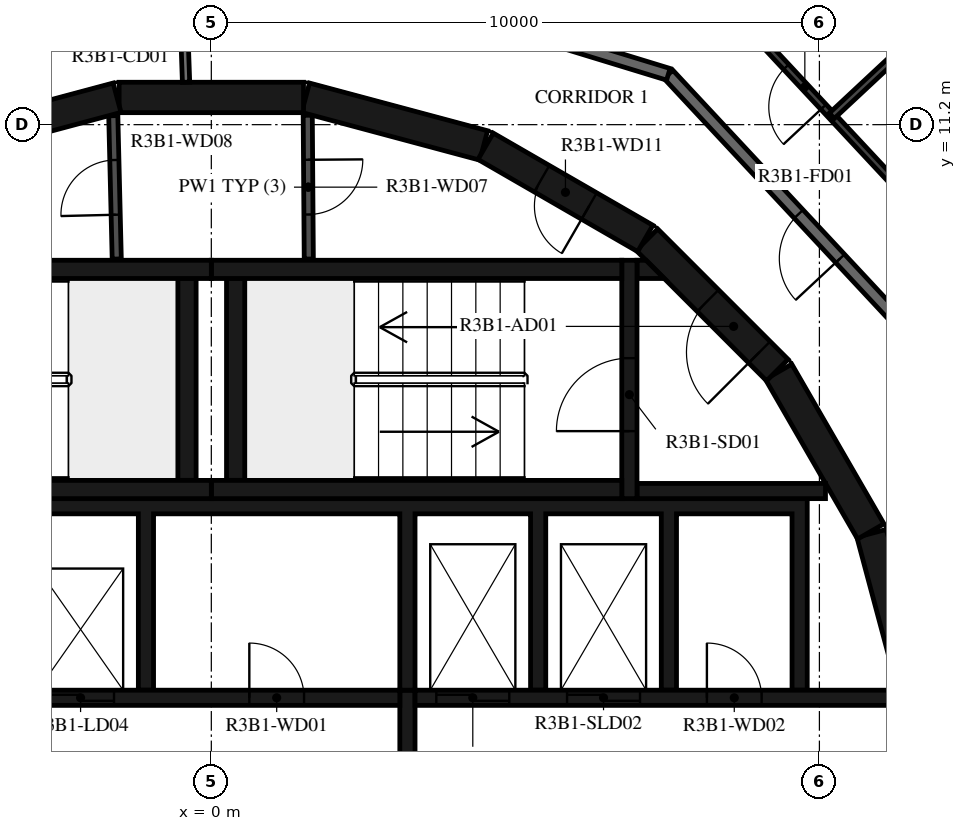
"""IFC4 building model, lengths in metres.
Left out: names, types, materials, properties, quantities, classifications, styles, units other than length and angle.
Written with IfcOpenShell. Run it as: python <this file> out.ifc"""

import sys

from ifc_helpers import new_model, si_unit, direction, frame, frame_2d, origin, place, context, subcontext, project, spatial, polyline, rectangle, outline, extrude, element, fill, save


model = new_model("IFC4")
c1 = context("Model", 3, precision=1e-05, world=origin(), true_north=direction((0.0, 1.0)))
c2 = subcontext(c1, "Body", "Model", "MODEL_VIEW")
j1 = project(units=[si_unit("LENGTHUNIT", "METRE"), si_unit("PLANEANGLEUNIT", "RADIAN")], contexts=[c1])
p1 = place(None, origin())
s1 = spatial("IfcSite", under=j1, at=p1, CompositionType="ELEMENT")
p2 = place(p1, origin())
s2 = spatial("IfcBuilding", under=s1, at=p2, CompositionType="ELEMENT")
p3 = place(p2, frame((0.0, 0.0, 123.9)))
s3 = spatial("IfcBuildingStorey", under=s2, at=p3, CompositionType="ELEMENT", Elevation=123.9)
for number, where, z_axis, x_axis in (
    (1, (11.643, 1.55, 0.0), (0.0, 0.0, 1.0), (-0.259, 0.966, 0.0)),
    (2, (10.845, 4.51, 0.0), (0.0, 0.0, 1.0), (-0.5, 0.866, 0.0)),
):
    element("IfcWall", number, at=place(p3, frame(where, z_axis=z_axis, x_axis=x_axis)), inside=s3, PredefinedType="SHEAR", context=c2, shape_type="SweptSolid", body=[
        extrude(rectangle(XDim=3.033, YDim=0.5, at=frame_2d((1.516, 0.0))), origin(), (0.0, 0.0, 1.0), 3.12),
    ])
p4 = place(p3, frame((9.308, 7.164, 0.0), z_axis=(0.0, 0.0, 1.0), x_axis=(-0.707106781187, 0.707106781187, 0.0)))
e3 = element("IfcWall", 3, at=p4, inside=s3, PredefinedType="SHEAR", context=c2, shape_type="SweptSolid", body=[
    extrude(rectangle(XDim=3.032, YDim=0.5, at=frame_2d((1.516, 0.0))), origin(), (0.0, 0.0, 1.0), 3.12),
])
p5 = place(p4, frame((0.416, 0.0, 0.0)))
e4 = element("IfcOpeningElement", 4, at=p5, cuts=e3, PredefinedType="OPENING", context=c2, shape_type="SweptSolid", body=[
    extrude(rectangle(XDim=1.2, YDim=2.1, at=frame_2d((0.6, 1.05))), frame((0.0, 0.26, 0.0), z_axis=(0.0, -1.0, 0.0), x_axis=(1.0, 0.0, 0.0)), (0.0, 0.0, 1.0), 0.52),
])
p6 = place(p3, frame((7.137, 9.329, 0.0), z_axis=(0.0, 0.0, 1.0), x_axis=(-0.865975092491, 0.500087131594, 0.0)))
e5 = element("IfcWall", 5, at=p6, inside=s3, PredefinedType="SHEAR", context=c2, shape_type="SweptSolid", body=[
    extrude(rectangle(XDim=3.033, YDim=0.5, at=frame_2d((1.516, 0.0))), origin(), (0.0, 0.0, 1.0), 3.12),
])
p7 = place(p6, frame((1.066, 0.0, 0.0)))
e6 = element("IfcOpeningElement", 6, at=p7, cuts=e5, PredefinedType="OPENING", context=c2, shape_type="SweptSolid", body=[
    extrude(rectangle(XDim=0.9, YDim=2.1, at=frame_2d((0.45, 1.05))), frame((0.0, 0.26, 0.0), z_axis=(0.0, -1.0, 0.0), x_axis=(1.0, 0.0, 0.0)), (0.0, 0.0, 1.0), 0.52),
])
for number, where, z_axis, x_axis in (
    (7, (4.479, 10.858, 0.0), (0.0, 0.0, 1.0), (-0.966, 0.259, 0.0)),
    (8, (1.516, 11.647, 0.0), (0.0, 0.0, 1.0), (-1.0, 0.0, 0.0)),
    (9, (-1.55, 11.643, 0.0), (0.0, 0.0, 1.0), (-0.966, -0.259, 0.0)),
):
    element("IfcWall", number, at=place(p3, frame(where, z_axis=z_axis, x_axis=x_axis)), inside=s3, PredefinedType="SHEAR", context=c2, shape_type="SweptSolid", body=[
        extrude(rectangle(XDim=3.033, YDim=0.5, at=frame_2d((1.516, 0.0))), origin(), (0.0, 0.0, 1.0), 3.12),
    ])
for number, where, z_axis, x_axis in (
    (10, (0.0, 5.2, 0.0), (0.0, 0.0, 1.0), (1.0, 0.0, 0.0)),
    (11, (0.0, 8.82, 0.0), (0.0, 0.0, 1.0), (1.0, 0.0, 0.0)),
):
    element("IfcWall", number, at=place(p3, frame(where, z_axis=z_axis, x_axis=x_axis)), inside=s3, PredefinedType="SHEAR", context=c2, shape_type="SweptSolid", body=[
        extrude(rectangle(XDim=6.75, YDim=0.3, at=frame_2d((3.375, 0.0))), origin(), (0.0, 0.0, 1.0), 3.12),
    ])
p8 = place(p3, frame((0.4, 5.35, 0.0), z_axis=(0.0, 0.0, 1.0), x_axis=(0.0, 1.0, 0.0)))
e12 = element("IfcWall", 12, at=p8, inside=s3, PredefinedType="SHEAR", context=c2, shape_type="SweptSolid", body=[
    extrude(rectangle(XDim=3.32, YDim=0.3, at=frame_2d((1.66, 0.0))), origin(), (0.0, 0.0, 1.0), 3.12),
])
p9 = place(p3, frame((6.875, 5.05, 0.0), z_axis=(0.0, 0.0, 1.0), x_axis=(0.0, 1.0, 0.0)))
e13 = element("IfcWall", 13, at=p9, inside=s3, PredefinedType="SHEAR", context=c2, shape_type="SweptSolid", body=[
    extrude(rectangle(XDim=3.92, YDim=0.25, at=frame_2d((1.96, 0.0))), origin(), (0.0, 0.0, 1.0), 3.12),
])
p10 = place(p9, frame((1.11, 0.0, 0.0)))
e14 = element("IfcOpeningElement", 14, at=p10, cuts=e13, PredefinedType="OPENING", context=c2, shape_type="SweptSolid", body=[
    extrude(rectangle(XDim=1.2, YDim=2.1, at=frame_2d((0.6, 1.05))), frame((0.0, 0.135, 0.0), z_axis=(0.0, -1.0, 0.0), x_axis=(1.0, 0.0, 0.0)), (0.0, 0.0, 1.0), 0.27),
])
p11 = place(p3, frame((7.0, 5.175, 0.0), z_axis=(0.0, 0.0, 1.0), x_axis=(1.0, 0.0, 0.0)))
e15 = element("IfcWall", 15, at=p11, inside=s3, PredefinedType="SHEAR", context=c2, shape_type="SweptSolid", body=[
    extrude(rectangle(XDim=3.1, YDim=0.25, at=frame_2d((1.55, 0.0))), origin(), (0.0, 0.0, 1.0), 3.12),
])
p12 = place(p3, origin())
e16 = element("IfcWall", 16, at=p12, inside=s3, PredefinedType="SHEAR", context=c2, shape_type="SweptSolid", body=[
    extrude(outline(polyline([(7.448, 8.67), (7.0, 8.67), (7.0, 8.97), (7.148, 8.97), (7.448, 8.67)])), origin(), (0.0, 0.0, 1.0), 3.12),
])
for number, where, z_axis, x_axis in (
    (17, (-6.75, 5.2, 0.0), (0.0, 0.0, 1.0), (1.0, 0.0, 0.0)),
    (18, (-6.75, 8.82, 0.0), (0.0, 0.0, 1.0), (1.0, 0.0, 0.0)),
):
    element("IfcWall", number, at=place(p3, frame(where, z_axis=z_axis, x_axis=x_axis)), inside=s3, PredefinedType="SHEAR", context=c2, shape_type="SweptSolid", body=[
        extrude(rectangle(XDim=6.75, YDim=0.3, at=frame_2d((3.375, 0.0))), origin(), (0.0, 0.0, 1.0), 3.12),
    ])
p13 = place(p3, frame((-0.4, 5.35, 0.0), z_axis=(0.0, 0.0, 1.0), x_axis=(0.0, 1.0, 0.0)))
e19 = element("IfcWall", 19, at=p13, inside=s3, PredefinedType="SHEAR", context=c2, shape_type="SweptSolid", body=[
    extrude(rectangle(XDim=3.32, YDim=0.3, at=frame_2d((1.66, 0.0))), origin(), (0.0, 0.0, 1.0), 3.12),
])
p14 = place(p3, origin())
e20 = element("IfcWall", 20, at=p14, inside=s3, PredefinedType="SHEAR", context=c2, shape_type="SweptSolid", body=[
    extrude(outline(polyline([(-9.55, 4.8), (-7.65, 4.8), (-7.65, 1.9), (-7.4, 1.9), (-7.4, 4.8), (-5.5, 4.8), (-5.5, 1.9), (-5.25, 1.9), (-5.25, 4.8), (-3.35, 4.8), (-3.35, 1.9), (-3.1, 1.9), (-3.1, 4.8), (-1.2, 4.8), (-1.2, 1.9), (-0.95, 1.9), (-0.95, 4.8), (3.1, 4.8), (3.1, 1.9), (3.35, 1.9), (3.35, 4.8), (5.25, 4.8), (5.25, 1.9), (5.5, 1.9), (5.5, 4.8), (7.4, 4.8), (7.4, 1.9), (7.65, 1.9), (7.65, 4.8), (9.55, 4.8), (9.55, 1.9), (9.8, 1.9), (9.8, 4.8), (9.8, 5.05), (-9.8, 5.05), (-9.8, 4.8), (-9.8, 1.9), (-9.55, 1.9), (-9.55, 4.8)])), origin(), (0.0, 0.0, 1.0), 3.12),
])
p15 = place(p3, frame((-11.28, 1.775, 0.0), z_axis=(0.0, 0.0, 1.0), x_axis=(1.0, 0.0, 0.0)))
e21 = element("IfcWall", 21, at=p15, inside=s3, PredefinedType="SHEAR", context=c2, shape_type="SweptSolid", body=[
    extrude(rectangle(XDim=14.38, YDim=0.25, at=frame_2d((7.19, 0.0))), origin(), (0.0, 0.0, 1.0), 3.12),
])
p16 = place(p15, frame((2.13, 0.0, 0.0)))
e22 = element("IfcOpeningElement", 22, at=p16, cuts=e21, PredefinedType="OPENING", context=c2, shape_type="SweptSolid", body=[
    extrude(rectangle(XDim=1.1, YDim=2.1, at=frame_2d((0.55, 1.05))), frame((0.0, 0.135, 0.0), z_axis=(0.0, -1.0, 0.0), x_axis=(1.0, 0.0, 0.0)), (0.0, 0.0, 1.0), 0.27),
])
p17 = place(p15, frame((4.28, 0.0, 0.0)))
e23 = element("IfcOpeningElement", 23, at=p17, cuts=e21, PredefinedType="OPENING", context=c2, shape_type="SweptSolid", body=[
    extrude(rectangle(XDim=1.1, YDim=2.1, at=frame_2d((0.55, 1.05))), frame((0.0, 0.135, 0.0), z_axis=(0.0, -1.0, 0.0), x_axis=(1.0, 0.0, 0.0)), (0.0, 0.0, 1.0), 0.27),
])
p18 = place(p15, frame((6.43, 0.0, 0.0)))
e24 = element("IfcOpeningElement", 24, at=p18, cuts=e21, PredefinedType="OPENING", context=c2, shape_type="SweptSolid", body=[
    extrude(rectangle(XDim=1.1, YDim=2.1, at=frame_2d((0.55, 1.05))), frame((0.0, 0.135, 0.0), z_axis=(0.0, -1.0, 0.0), x_axis=(1.0, 0.0, 0.0)), (0.0, 0.0, 1.0), 0.27),
])
p19 = place(p15, frame((8.58, 0.0, 0.0)))
e25 = element("IfcOpeningElement", 25, at=p19, cuts=e21, PredefinedType="OPENING", context=c2, shape_type="SweptSolid", body=[
    extrude(rectangle(XDim=1.1, YDim=2.1, at=frame_2d((0.55, 1.05))), frame((0.0, 0.135, 0.0), z_axis=(0.0, -1.0, 0.0), x_axis=(1.0, 0.0, 0.0)), (0.0, 0.0, 1.0), 0.27),
])
p20 = place(p15, frame((11.905, 0.0, 0.0)))
e26 = element("IfcOpeningElement", 26, at=p20, cuts=e21, PredefinedType="OPENING", context=c2, shape_type="SweptSolid", body=[
    extrude(rectangle(XDim=0.9, YDim=2.1, at=frame_2d((0.45, 1.05))), frame((0.0, 0.135, 0.0), z_axis=(0.0, -1.0, 0.0), x_axis=(1.0, 0.0, 0.0)), (0.0, 0.0, 1.0), 0.27),
])
p21 = place(p3, frame((3.35, 1.775, 0.0), z_axis=(0.0, 0.0, 1.0), x_axis=(1.0, 0.0, 0.0)))
e27 = element("IfcWall", 27, at=p21, inside=s3, PredefinedType="SHEAR", context=c2, shape_type="SweptSolid", body=[
    extrude(rectangle(XDim=7.93, YDim=0.25, at=frame_2d((3.965, 0.0))), origin(), (0.0, 0.0, 1.0), 3.12),
])
p22 = place(p21, frame((0.35, 0.0, 0.0)))
e28 = element("IfcOpeningElement", 28, at=p22, cuts=e27, PredefinedType="OPENING", context=c2, shape_type="SweptSolid", body=[
    extrude(rectangle(XDim=1.2, YDim=2.4, at=frame_2d((0.6, 1.2))), frame((0.0, 0.135, 0.0), z_axis=(0.0, -1.0, 0.0), x_axis=(1.0, 0.0, 0.0)), (0.0, 0.0, 1.0), 0.27),
])
p23 = place(p21, frame((2.5, 0.0, 0.0)))
e29 = element("IfcOpeningElement", 29, at=p23, cuts=e27, PredefinedType="OPENING", context=c2, shape_type="SweptSolid", body=[
    extrude(rectangle(XDim=1.2, YDim=2.4, at=frame_2d((0.6, 1.2))), frame((0.0, 0.135, 0.0), z_axis=(0.0, -1.0, 0.0), x_axis=(1.0, 0.0, 0.0)), (0.0, 0.0, 1.0), 0.27),
])
p24 = place(p21, frame((4.8, 0.0, 0.0)))
e30 = element("IfcOpeningElement", 30, at=p24, cuts=e27, PredefinedType="OPENING", context=c2, shape_type="SweptSolid", body=[
    extrude(rectangle(XDim=0.9, YDim=2.1, at=frame_2d((0.45, 1.05))), frame((0.0, 0.135, 0.0), z_axis=(0.0, -1.0, 0.0), x_axis=(1.0, 0.0, 0.0)), (0.0, 0.0, 1.0), 0.27),
])
p25 = place(p3, frame((3.225, -1.9, 0.0), z_axis=(0.0, 0.0, 1.0), x_axis=(0.0, 1.0, 0.0)))
e31 = element("IfcWall", 31, at=p25, inside=s3, PredefinedType="SHEAR", context=c2, shape_type="SweptSolid", body=[
    extrude(rectangle(XDim=3.8, YDim=0.25, at=frame_2d((1.9, 0.0))), origin(), (0.0, 0.0, 1.0), 3.12),
])
p26 = place(p3, frame((1.586, 11.354, 0.0), z_axis=(0.0, 0.0, 1.0), x_axis=(0.007227482881, -0.999973881405, 0.0)))
e32 = element("IfcWall", 32, at=p26, inside=s3, PredefinedType="PARTITIONING", context=c2, shape_type="SweptSolid", body=[
    extrude(rectangle(XDim=2.365, YDim=0.15, at=frame_2d((1.182, 0.0))), origin(), (0.0, 0.0, 1.0), 3.12),
])
p27 = place(p26, frame((0.732, 0.0, 0.0)))
e33 = element("IfcOpeningElement", 33, at=p27, cuts=e32, PredefinedType="OPENING", context=c2, shape_type="SweptSolid", body=[
    extrude(rectangle(XDim=0.9, YDim=2.1, at=frame_2d((0.45, 1.05))), frame((0.0, 0.085, 0.0), z_axis=(0.0, -1.0, 0.0), x_axis=(1.0, 0.0, 0.0)), (0.0, 0.0, 1.0), 0.17),
])
p28 = place(p3, frame((-1.555, 8.99, 0.0), z_axis=(0.0, 0.0, 1.0), x_axis=(-0.024125549686, 0.999708936567, 0.0)))
e34 = element("IfcWall", 34, at=p28, inside=s3, PredefinedType="PARTITIONING", context=c2, shape_type="SweptSolid", body=[
    extrude(rectangle(XDim=2.358, YDim=0.15, at=frame_2d((1.179, 0.0))), origin(), (0.0, 0.0, 1.0), 3.12),
])
p29 = place(p28, frame((0.729, 0.0, 0.0)))
e35 = element("IfcOpeningElement", 35, at=p29, cuts=e34, PredefinedType="OPENING", context=c2, shape_type="SweptSolid", body=[
    extrude(rectangle(XDim=0.9, YDim=2.1, at=frame_2d((0.45, 1.05))), frame((0.0, 0.085, 0.0), z_axis=(0.0, -1.0, 0.0), x_axis=(1.0, 0.0, 0.0)), (0.0, 0.0, 1.0), 0.17),
])
p30 = place(p3, frame((-0.487, 13.948, 0.0), z_axis=(0.0, 0.0, 1.0), x_axis=(0.034859752231, -0.999392214135, 0.0)))
e36 = element("IfcWall", 36, at=p30, inside=s3, PredefinedType="PARTITIONING", context=c2, shape_type="SweptSolid", body=[
    extrude(rectangle(XDim=2.052, YDim=0.12, at=frame_2d((1.026, 0.0))), origin(), (0.0, 0.0, 1.0), 3.12),
])
p31 = place(p30, frame((0.125, 0.0, 0.0)))
e37 = element("IfcOpeningElement", 37, at=p31, cuts=e36, PredefinedType="OPENING", context=c2, shape_type="SweptSolid", body=[
    extrude(rectangle(XDim=1.2, YDim=2.1, at=frame_2d((0.6, 1.05))), frame((0.0, 0.07, 0.0), z_axis=(0.0, -1.0, 0.0), x_axis=(1.0, 0.0, 0.0)), (0.0, 0.0, 1.0), 0.14),
])
p32 = place(p3, frame((12.523, 6.659, 0.0), z_axis=(0.0, 0.0, 1.0), x_axis=(-0.682001841105, 0.731350455479, 0.0)))
e38 = element("IfcWall", 38, at=p32, inside=s3, PredefinedType="STANDARD", context=c2, shape_type="SweptSolid", body=[
    extrude(rectangle(XDim=7.342, YDim=0.2, at=frame_2d((3.671, 0.0))), origin(), (0.0, 0.0, 1.0), 3.12),
])
p33 = place(p32, frame((3.2, 0.0, 0.0)))
e39 = element("IfcOpeningElement", 39, at=p33, cuts=e38, PredefinedType="OPENING", context=c2, shape_type="SweptSolid", body=[
    extrude(rectangle(XDim=1.0, YDim=2.1, at=frame_2d((0.5, 1.05))), frame((0.0, 0.11, 0.0), z_axis=(0.0, -1.0, 0.0), x_axis=(1.0, 0.0, 0.0)), (0.0, 0.0, 1.0), 0.22),
])
p34 = place(p3, frame((7.516, 12.028, 0.0), z_axis=(0.0, 0.0, 1.0), x_axis=(-0.956306642771, 0.292365533182, 0.0)))
e40 = element("IfcWall", 40, at=p34, inside=s3, PredefinedType="STANDARD", context=c2, shape_type="SweptSolid", body=[
    extrude(rectangle(XDim=7.342, YDim=0.2, at=frame_2d((3.671, 0.0))), origin(), (0.0, 0.0, 1.0), 3.12),
])
p35 = place(p3, frame((13.254, 8.075, 0.0), z_axis=(0.0, 0.0, 1.0), x_axis=(-0.681995901471, 0.731355994285, 0.0)))
e41 = element("IfcWall", 41, at=p35, inside=s3, PredefinedType="PARTITIONING", context=c2, shape_type="SweptSolid", body=[
    extrude(rectangle(XDim=7.207, YDim=0.12, at=frame_2d((3.603, 0.0))), origin(), (0.0, 0.0, 1.0), 3.12),
])
p36 = place(p35, frame((4.672, 0.0, 0.0)))
e42 = element("IfcOpeningElement", 42, at=p36, cuts=e41, PredefinedType="OPENING", context=c2, shape_type="SweptSolid", body=[
    extrude(rectangle(XDim=0.9, YDim=2.1, at=frame_2d((0.45, 1.05))), frame((0.0, 0.07, 0.0), z_axis=(0.0, -1.0, 0.0), x_axis=(1.0, 0.0, 0.0)), (0.0, 0.0, 1.0), 0.14),
])
p37 = place(p3, frame((12.903, 13.862, 0.0), z_axis=(0.0, 0.0, 1.0), x_axis=(-0.731380732155, -0.68196937221, 0.0)))
e43 = element("IfcWall", 43, at=p37, inside=s3, PredefinedType="PARTITIONING", context=c2, shape_type="SweptSolid", body=[
    extrude(rectangle(XDim=3.691, YDim=0.12, at=frame_2d((1.845, 0.0))), origin(), (0.0, 0.0, 1.0), 2.73),
])
p38 = place(p10, origin())
e44 = element("IfcDoor", 44, at=p38, inside=s3, OperationType="SINGLE_SWING_LEFT", PredefinedType="DOOR", context=c2, shape_type="SweptSolid", body=[
    extrude(rectangle(XDim=1.2, YDim=2.1, at=frame_2d((0.6, 1.05))), frame((0.0, 0.025, 0.0), z_axis=(0.0, -1.0, 0.0), x_axis=(1.0, 0.0, 0.0)), (0.0, 0.0, 1.0), 0.05),
])
fill(e14, e44)
p39 = place(p5, origin())
e45 = element("IfcDoor", 45, at=p39, inside=s3, OperationType="SINGLE_SWING_RIGHT", PredefinedType="DOOR", context=c2, shape_type="SweptSolid", body=[
    extrude(rectangle(XDim=1.2, YDim=2.1, at=frame_2d((0.6, 1.05))), frame((0.0, 0.025, 0.0), z_axis=(0.0, -1.0, 0.0), x_axis=(1.0, 0.0, 0.0)), (0.0, 0.0, 1.0), 0.05),
])
fill(e4, e45)
p40 = place(p19, origin())
e46 = element("IfcDoor", 46, at=p40, inside=s3, OperationType="DOUBLE_DOOR_SLIDING", PredefinedType="DOOR", context=c2, shape_type="SweptSolid", body=[
    extrude(rectangle(XDim=1.1, YDim=2.1, at=frame_2d((0.55, 1.05))), frame((0.0, 0.025, 0.0), z_axis=(0.0, -1.0, 0.0), x_axis=(1.0, 0.0, 0.0)), (0.0, 0.0, 1.0), 0.05),
])
fill(e25, e46)
p41 = place(p22, origin())
e47 = element("IfcDoor", 47, at=p41, inside=s3, OperationType="DOUBLE_DOOR_SLIDING", PredefinedType="DOOR", context=c2, shape_type="SweptSolid", body=[
    extrude(rectangle(XDim=1.2, YDim=2.4, at=frame_2d((0.6, 1.2))), frame((0.0, 0.025, 0.0), z_axis=(0.0, -1.0, 0.0), x_axis=(1.0, 0.0, 0.0)), (0.0, 0.0, 1.0), 0.05),
])
fill(e28, e47)
p42 = place(p23, origin())
e48 = element("IfcDoor", 48, at=p42, inside=s3, OperationType="DOUBLE_DOOR_SLIDING", PredefinedType="DOOR", context=c2, shape_type="SweptSolid", body=[
    extrude(rectangle(XDim=1.2, YDim=2.4, at=frame_2d((0.6, 1.2))), frame((0.0, 0.025, 0.0), z_axis=(0.0, -1.0, 0.0), x_axis=(1.0, 0.0, 0.0)), (0.0, 0.0, 1.0), 0.05),
])
fill(e29, e48)
p43 = place(p20, origin())
e49 = element("IfcDoor", 49, at=p43, inside=s3, OperationType="SINGLE_SWING_RIGHT", PredefinedType="DOOR", context=c2, shape_type="SweptSolid", body=[
    extrude(rectangle(XDim=0.9, YDim=2.1, at=frame_2d((0.45, 1.05))), frame((0.0, 0.025, 0.0), z_axis=(0.0, -1.0, 0.0), x_axis=(1.0, 0.0, 0.0)), (0.0, 0.0, 1.0), 0.05),
])
fill(e26, e49)
p44 = place(p24, origin())
e50 = element("IfcDoor", 50, at=p44, inside=s3, OperationType="SINGLE_SWING_LEFT", PredefinedType="DOOR", context=c2, shape_type="SweptSolid", body=[
    extrude(rectangle(XDim=0.9, YDim=2.1, at=frame_2d((0.45, 1.05))), frame((0.0, 0.025, 0.0), z_axis=(0.0, -1.0, 0.0), x_axis=(1.0, 0.0, 0.0)), (0.0, 0.0, 1.0), 0.05),
])
fill(e30, e50)
p45 = place(p27, origin())
e51 = element("IfcDoor", 51, at=p45, inside=s3, OperationType="SINGLE_SWING_RIGHT", PredefinedType="DOOR", context=c2, shape_type="SweptSolid", body=[
    extrude(rectangle(XDim=0.9, YDim=2.1, at=frame_2d((0.45, 1.05))), frame((0.0, 0.025, 0.0), z_axis=(0.0, -1.0, 0.0), x_axis=(1.0, 0.0, 0.0)), (0.0, 0.0, 1.0), 0.05),
])
fill(e33, e51)
p46 = place(p29, origin())
e52 = element("IfcDoor", 52, at=p46, inside=s3, OperationType="SINGLE_SWING_LEFT", PredefinedType="DOOR", context=c2, shape_type="SweptSolid", body=[
    extrude(rectangle(XDim=0.9, YDim=2.1, at=frame_2d((0.45, 1.05))), frame((0.0, 0.025, 0.0), z_axis=(0.0, -1.0, 0.0), x_axis=(1.0, 0.0, 0.0)), (0.0, 0.0, 1.0), 0.05),
])
fill(e35, e52)
p47 = place(p7, origin())
e53 = element("IfcDoor", 53, at=p47, inside=s3, OperationType="SINGLE_SWING_RIGHT", PredefinedType="DOOR", context=c2, shape_type="SweptSolid", body=[
    extrude(rectangle(XDim=0.9, YDim=2.1, at=frame_2d((0.45, 1.05))), frame((0.0, 0.025, 0.0), z_axis=(0.0, -1.0, 0.0), x_axis=(1.0, 0.0, 0.0)), (0.0, 0.0, 1.0), 0.05),
])
fill(e6, e53)
p48 = place(p33, origin())
e54 = element("IfcDoor", 54, at=p48, inside=s3, OperationType="SINGLE_SWING_RIGHT", PredefinedType="DOOR", context=c2, shape_type="SweptSolid", body=[
    extrude(rectangle(XDim=1.0, YDim=2.1, at=frame_2d((0.5, 1.05))), frame((0.0, 0.025, 0.0), z_axis=(0.0, -1.0, 0.0), x_axis=(1.0, 0.0, 0.0)), (0.0, 0.0, 1.0), 0.05),
])
fill(e39, e54)
p49 = place(p36, origin())
e55 = element("IfcDoor", 55, at=p49, inside=s3, OperationType="SINGLE_SWING_RIGHT", PredefinedType="DOOR", context=c2, shape_type="SweptSolid", body=[
    extrude(rectangle(XDim=0.9, YDim=2.1, at=frame_2d((0.45, 1.05))), frame((0.0, 0.025, 0.0), z_axis=(0.0, -1.0, 0.0), x_axis=(1.0, 0.0, 0.0)), (0.0, 0.0, 1.0), 0.05),
])
fill(e42, e55)
save(model, sys.argv[1])
